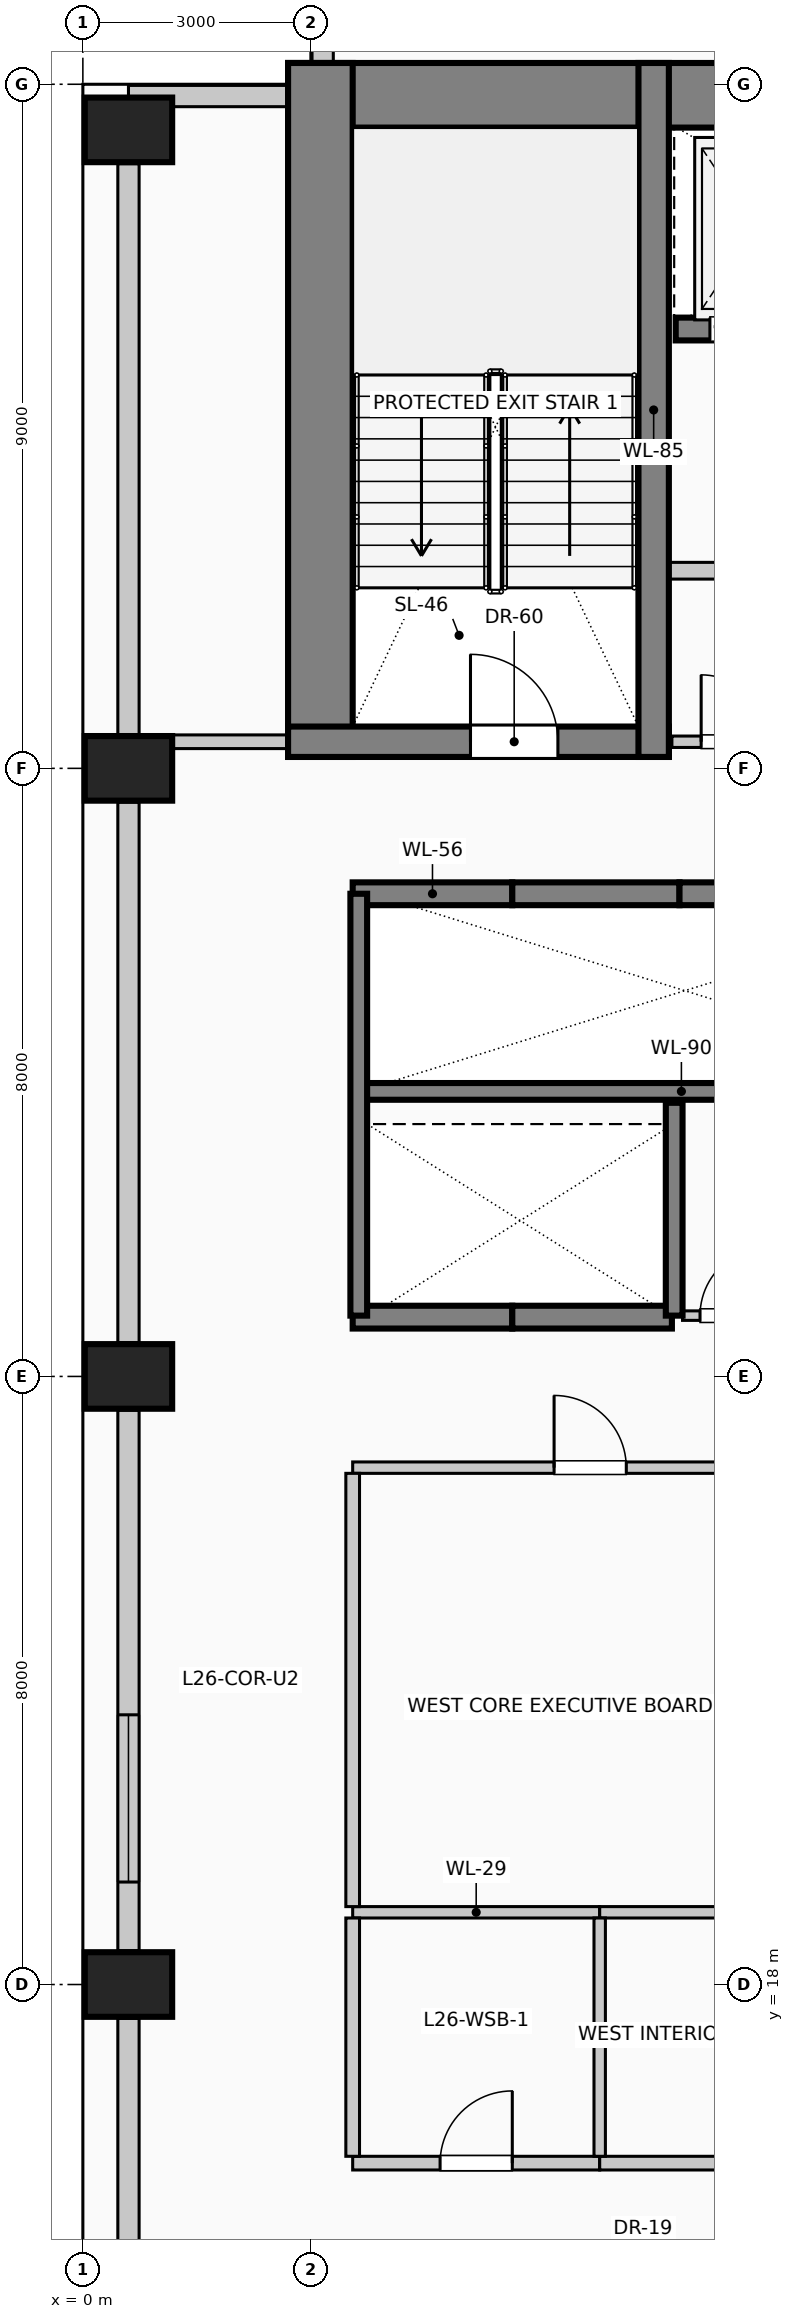
"""IFC4 building model, lengths in metres.
Left out: names, types, materials, properties, quantities, classifications, styles, units other than length and angle.
Written with IfcOpenShell. Run it as: python <this file> out.ifc"""

import sys

from ifc_helpers import new_model, si_unit, direction, frame, frame_2d, origin, origin_2d, place, context, subcontext, project, spatial, rectangle, extrude, element, fill, save


model = new_model("IFC4")
c1 = context("Model", 3, precision=1e-05, world=origin(), true_north=direction((0.0, 1.0)))
c2 = subcontext(c1, "Body", "Model", "MODEL_VIEW")
j1 = project(units=[si_unit("LENGTHUNIT", "METRE"), si_unit("PLANEANGLEUNIT", "RADIAN")], contexts=[c1])
p1 = place(None, origin())
s1 = spatial("IfcSite", under=j1, at=p1, CompositionType="ELEMENT")
p2 = place(p1, origin())
s2 = spatial("IfcBuilding", under=s1, at=p2, CompositionType="ELEMENT")
p3 = place(p2, frame((0.0, 0.0, 108.6)))
s3 = spatial("IfcBuildingStorey", under=s2, at=p3, CompositionType="ELEMENT", Elevation=108.6)
p4 = place(p3, frame((2.7, 42.855, 0.0), z_axis=(0.0, 0.0, 1.0), x_axis=(1.0, 0.0, 0.0)))
e1 = element("IfcWall", 1, at=p4, inside=s3, PredefinedType="SHEAR", context=c2, shape_type="SweptSolid", body=[
    extrude(rectangle(XDim=14.6, YDim=0.85, at=frame_2d((7.3, 0.0))), origin(), (0.0, 0.0, 1.0), 4.0),
])
p5 = place(p3, frame((3.125, 34.15, 0.0), z_axis=(0.0, 0.0, 1.0), x_axis=(0.0, 1.0, 0.0)))
e2 = element("IfcWall", 2, at=p5, inside=s3, PredefinedType="SHEAR", context=c2, shape_type="SweptSolid", body=[
    extrude(rectangle(XDim=9.13, YDim=0.85, at=frame_2d((4.565, 0.0))), origin(), (0.0, 0.0, 1.0), 4.0),
])
p6 = place(p3, frame((2.7, 34.35, 0.0), z_axis=(0.0, 0.0, 1.0), x_axis=(1.0, 0.0, 0.0)))
e3 = element("IfcWall", 3, at=p6, inside=s3, PredefinedType="SHEAR", context=c2, shape_type="SweptSolid", body=[
    extrude(rectangle(XDim=5.01, YDim=0.4, at=frame_2d((2.505, 0.0))), origin(), (0.0, 0.0, 1.0), 4.0),
])
p7 = place(p6, frame((2.4, 0.0, 0.0)))
e4 = element("IfcOpeningElement", 4, at=p7, cuts=e3, PredefinedType="OPENING", context=c2, shape_type="SweptSolid", body=[
    extrude(rectangle(XDim=1.15, YDim=2.2, at=frame_2d((0.575, 1.1))), frame((0.0, 0.21, 0.0), z_axis=(0.0, -1.0, 0.0), x_axis=(1.0, 0.0, 0.0)), (0.0, 0.0, 1.0), 0.42),
])
p8 = place(p3, frame((7.51, 34.15, 0.0), z_axis=(0.0, 0.0, 1.0), x_axis=(0.0, 1.0, 0.0)))
e5 = element("IfcWall", 5, at=p8, inside=s3, PredefinedType="SHEAR", context=c2, shape_type="SweptSolid", body=[
    extrude(rectangle(XDim=9.13, YDim=0.4, at=frame_2d((4.565, 0.0))), origin(), (0.0, 0.0, 1.0), 4.0),
])
for number, where, z_axis, x_axis in (
    (6, (0.6, 18.0, 0.0), (0.0, 0.0, 1.0), (0.0, 1.0, 0.0)),
    (7, (0.6, 26.0, 0.0), (0.0, 0.0, 1.0), (0.0, 1.0, 0.0)),
    (8, (0.6, 34.0, 0.0), (0.0, 0.0, 1.0), (0.0, 1.0, 0.0)),
    (9, (0.6, 42.4, 0.0), (0.0, 0.0, 1.0), (0.0, 1.0, 0.0)),
):
    element("IfcColumn", number, at=place(p3, frame(where, z_axis=z_axis, x_axis=x_axis)), inside=s3, PredefinedType="COLUMN", context=c2, shape_type="SweptSolid", body=[
        extrude(rectangle(XDim=0.85, YDim=1.15, at=origin_2d()), origin(), (0.0, 0.0, 1.0), 4.0),
    ])
p9 = place(p3, frame((0.6, 10.445, 0.0), z_axis=(0.0, 0.0, 1.0), x_axis=(0.0, 1.0, 0.0)))
e10 = element("IfcWall", 10, at=p9, inside=s3, PredefinedType="SOLIDWALL", context=c2, shape_type="SweptSolid", body=[
    extrude(rectangle(XDim=7.11, YDim=0.28, at=frame_2d((3.555, 0.0))), origin(), (0.0, 0.0, 1.0), 2.875),
])
p10 = place(p3, frame((0.6, 18.445, 0.0), z_axis=(0.0, 0.0, 1.0), x_axis=(0.0, 1.0, 0.0)))
e11 = element("IfcWall", 11, at=p10, inside=s3, PredefinedType="SOLIDWALL", context=c2, shape_type="SweptSolid", body=[
    extrude(rectangle(XDim=7.11, YDim=0.28, at=frame_2d((3.555, 0.0))), origin(), (0.0, 0.0, 1.0), 2.875),
])
p11 = place(p10, frame((0.903, 0.0, 0.5)))
e12 = element("IfcOpeningElement", 12, at=p11, cuts=e11, PredefinedType="OPENING", context=c2, shape_type="SweptSolid", body=[
    extrude(rectangle(XDim=2.2, YDim=1.95, at=frame_2d((1.1, 0.975))), frame((0.0, 0.15, 0.0), z_axis=(0.0, -1.0, 0.0), x_axis=(1.0, 0.0, 0.0)), (0.0, 0.0, 1.0), 0.3),
])
p12 = place(p3, frame((0.6, 26.445, 0.0), z_axis=(0.0, 0.0, 1.0), x_axis=(0.0, 1.0, 0.0)))
e13 = element("IfcWall", 13, at=p12, inside=s3, PredefinedType="SOLIDWALL", context=c2, shape_type="SweptSolid", body=[
    extrude(rectangle(XDim=7.11, YDim=0.28, at=frame_2d((3.555, 0.0))), origin(), (0.0, 0.0, 1.0), 2.875),
])
p13 = place(p3, frame((0.6, 34.445, 0.0), z_axis=(0.0, 0.0, 1.0), x_axis=(0.0, 1.0, 0.0)))
e14 = element("IfcWall", 14, at=p13, inside=s3, PredefinedType="SOLIDWALL", context=c2, shape_type="SweptSolid", body=[
    extrude(rectangle(XDim=7.51, YDim=0.28, at=frame_2d((3.755, 0.0))), origin(), (0.0, 0.0, 1.0), 2.875),
])
p14 = place(p3, frame((0.6, 42.845, 0.0), z_axis=(0.0, 0.0, 1.0), x_axis=(1.0, 0.0, 0.0)))
e15 = element("IfcWall", 15, at=p14, inside=s3, PredefinedType="SOLIDWALL", context=c2, shape_type="SweptSolid", body=[
    extrude(rectangle(XDim=2.095, YDim=0.28, at=frame_2d((1.047, 0.0))), origin(), (0.0, 0.0, 1.0), 3.725),
])
p15 = place(p3, frame((3.155, 43.285, 0.0), z_axis=(0.0, 0.0, 1.0), x_axis=(0.0, 1.0, 0.0)))
e16 = element("IfcWall", 16, at=p15, inside=s3, PredefinedType="SOLIDWALL", context=c2, shape_type="SweptSolid", body=[
    extrude(rectangle(XDim=2.115, YDim=0.28, at=frame_2d((1.058, 0.0))), origin(), (0.0, 0.0, 1.0), 3.725),
])
p16 = place(p3, frame((3.55, 32.35, 0.0), z_axis=(0.0, 0.0, 1.0), x_axis=(1.0, 0.0, 0.0)))
e17 = element("IfcWall", 17, at=p16, inside=s3, PredefinedType="SOLIDWALL", context=c2, shape_type="SweptSolid", body=[
    extrude(rectangle(XDim=2.1, YDim=0.3, at=frame_2d((1.05, 0.0))), origin(), (0.0, 0.0, 1.0), 4.0),
])
p17 = place(p3, frame((5.65, 32.35, 0.0), z_axis=(0.0, 0.0, 1.0), x_axis=(1.0, 0.0, 0.0)))
e18 = element("IfcWall", 18, at=p17, inside=s3, PredefinedType="SOLIDWALL", context=c2, shape_type="SweptSolid", body=[
    extrude(rectangle(XDim=2.2, YDim=0.3, at=frame_2d((1.1, 0.0))), origin(), (0.0, 0.0, 1.0), 4.0),
])
p18 = place(p3, frame((7.85, 32.35, 0.0), z_axis=(0.0, 0.0, 1.0), x_axis=(1.0, 0.0, 0.0)))
e19 = element("IfcWall", 19, at=p18, inside=s3, PredefinedType="SOLIDWALL", context=c2, shape_type="SweptSolid", body=[
    extrude(rectangle(XDim=2.2, YDim=0.3, at=frame_2d((1.1, 0.0))), origin(), (0.0, 0.0, 1.0), 4.0),
])
p19 = place(p3, frame((5.65, 26.78, 0.0), z_axis=(0.0, 0.0, 1.0), x_axis=(-1.0, 0.0, 0.0)))
e20 = element("IfcWall", 20, at=p19, inside=s3, PredefinedType="SOLIDWALL", context=c2, shape_type="SweptSolid", body=[
    extrude(rectangle(XDim=2.1, YDim=0.3, at=frame_2d((1.05, 0.0))), origin(), (0.0, 0.0, 1.0), 4.0),
])
p20 = place(p3, frame((7.75, 26.78, 0.0), z_axis=(0.0, 0.0, 1.0), x_axis=(-1.0, 0.0, 0.0)))
e21 = element("IfcWall", 21, at=p20, inside=s3, PredefinedType="SOLIDWALL", context=c2, shape_type="SweptSolid", body=[
    extrude(rectangle(XDim=2.1, YDim=0.3, at=frame_2d((1.05, 0.0))), origin(), (0.0, 0.0, 1.0), 4.0),
])
p21 = place(p3, frame((10.0, 39.78, 0.0), z_axis=(0.0, 0.0, 1.0), x_axis=(-1.0, 0.0, 0.0)))
e22 = element("IfcWall", 22, at=p21, inside=s3, PredefinedType="SOLIDWALL", context=c2, shape_type="SweptSolid", body=[
    extrude(rectangle(XDim=2.2, YDim=0.3, at=frame_2d((1.1, 0.0))), origin(), (0.0, 0.0, 1.0), 4.0),
])
p22 = place(p21, frame((0.45, 0.0, 0.0)))
e23 = element("IfcOpeningElement", 23, at=p22, cuts=e22, PredefinedType="OPENING", context=c2, shape_type="SweptSolid", body=[
    extrude(rectangle(XDim=1.3, YDim=2.25, at=frame_2d((0.65, 1.125))), frame((0.0, 0.16, 0.0), z_axis=(0.0, -1.0, 0.0), x_axis=(1.0, 0.0, 0.0)), (0.0, 0.0, 1.0), 0.32),
])
p23 = place(p3, frame((3.55, 29.75, 0.0), z_axis=(0.0, 0.0, 1.0), x_axis=(1.0, 0.0, 0.0)))
e24 = element("IfcWall", 24, at=p23, inside=s3, PredefinedType="SOLIDWALL", context=c2, shape_type="SweptSolid", body=[
    extrude(rectangle(XDim=8.65, YDim=0.22, at=frame_2d((4.325, 0.0))), origin(), (0.0, 0.0, 1.0), 4.0),
])
p24 = place(p3, frame((3.63, 26.8, 0.0), z_axis=(0.0, 0.0, 1.0), x_axis=(0.0, 1.0, 0.0)))
e25 = element("IfcWall", 25, at=p24, inside=s3, PredefinedType="SOLIDWALL", context=c2, shape_type="SweptSolid", body=[
    extrude(rectangle(XDim=5.55, YDim=0.22, at=frame_2d((2.775, 0.0))), origin(), (0.0, 0.0, 1.0), 4.0),
])
p25 = place(p3, frame((7.78, 26.8, 0.0), z_axis=(0.0, 0.0, 1.0), x_axis=(0.0, 1.0, 0.0)))
e26 = element("IfcWall", 26, at=p25, inside=s3, PredefinedType="SOLIDWALL", context=c2, shape_type="SweptSolid", body=[
    extrude(rectangle(XDim=2.8, YDim=0.22, at=frame_2d((1.4, 0.0))), origin(), (0.0, 0.0, 1.0), 4.0),
])
p26 = place(p3, frame((7.51, 36.6, 0.0), z_axis=(0.0, 0.0, 1.0), x_axis=(1.0, 0.0, 0.0)))
e27 = element("IfcWall", 27, at=p26, inside=s3, PredefinedType="PARTITIONING", context=c2, shape_type="SweptSolid", body=[
    extrude(rectangle(XDim=4.98, YDim=0.22, at=frame_2d((2.49, 0.0))), origin(), (0.0, 0.0, 1.0), 3.725),
])
p27 = place(p26, frame((1.94, 0.0, 0.0)))
e28 = element("IfcOpeningElement", 28, at=p27, cuts=e27, PredefinedType="OPENING", context=c2, shape_type="SweptSolid", body=[
    extrude(rectangle(XDim=1.1, YDim=2.2, at=frame_2d((0.55, 1.1))), frame((0.0, 0.12, 0.0), z_axis=(0.0, -1.0, 0.0), x_axis=(1.0, 0.0, 0.0)), (0.0, 0.0, 1.0), 0.24),
])
p28 = place(p3, frame((3.55, 15.65, 0.0), z_axis=(0.0, 0.0, 1.0), x_axis=(1.0, 0.0, 0.0)))
e29 = element("IfcWall", 29, at=p28, inside=s3, PredefinedType="PARTITIONING", context=c2, shape_type="SweptSolid", body=[
    extrude(rectangle(XDim=3.25, YDim=0.18, at=frame_2d((1.625, 0.0))), origin(), (0.0, 0.0, 1.0), 3.725),
])
p29 = place(p28, frame((1.15, 0.0, 0.0)))
e30 = element("IfcOpeningElement", 30, at=p29, cuts=e29, PredefinedType="OPENING", context=c2, shape_type="SweptSolid", body=[
    extrude(rectangle(XDim=0.95, YDim=2.15, at=frame_2d((0.475, 1.075))), frame((0.0, 0.1, 0.0), z_axis=(0.0, -1.0, 0.0), x_axis=(1.0, 0.0, 0.0)), (0.0, 0.0, 1.0), 0.2),
])
p30 = place(p3, frame((6.8, 15.65, 0.0), z_axis=(0.0, 0.0, 1.0), x_axis=(1.0, 0.0, 0.0)))
e31 = element("IfcWall", 31, at=p30, inside=s3, PredefinedType="PARTITIONING", context=c2, shape_type="SweptSolid", body=[
    extrude(rectangle(XDim=9.05, YDim=0.18, at=frame_2d((4.525, 0.0))), origin(), (0.0, 0.0, 1.0), 3.725),
])
p31 = place(p30, frame((4.0, 0.0, 0.0)))
e32 = element("IfcOpeningElement", 32, at=p31, cuts=e31, PredefinedType="OPENING", context=c2, shape_type="SweptSolid", body=[
    extrude(rectangle(XDim=1.05, YDim=2.15, at=frame_2d((0.525, 1.075))), frame((0.0, 0.1, 0.0), z_axis=(0.0, -1.0, 0.0), x_axis=(1.0, 0.0, 0.0)), (0.0, 0.0, 1.0), 0.2),
])
p32 = place(p3, frame((3.55, 18.95, 0.0), z_axis=(0.0, 0.0, 1.0), x_axis=(1.0, 0.0, 0.0)))
e33 = element("IfcWall", 33, at=p32, inside=s3, PredefinedType="PARTITIONING", context=c2, shape_type="SweptSolid", body=[
    extrude(rectangle(XDim=3.25, YDim=0.15, at=frame_2d((1.625, 0.0))), origin(), (0.0, 0.0, 1.0), 3.725),
])
p33 = place(p3, frame((6.8, 18.95, 0.0), z_axis=(0.0, 0.0, 1.0), x_axis=(1.0, 0.0, 0.0)))
e34 = element("IfcWall", 34, at=p33, inside=s3, PredefinedType="PARTITIONING", context=c2, shape_type="SweptSolid", body=[
    extrude(rectangle(XDim=3.0, YDim=0.15, at=frame_2d((1.5, 0.0))), origin(), (0.0, 0.0, 1.0), 3.725),
])
p34 = place(p3, frame((3.55, 24.8, 0.0), z_axis=(0.0, 0.0, 1.0), x_axis=(1.0, 0.0, 0.0)))
e35 = element("IfcWall", 35, at=p34, inside=s3, PredefinedType="PARTITIONING", context=c2, shape_type="SweptSolid", body=[
    extrude(rectangle(XDim=6.25, YDim=0.15, at=frame_2d((3.125, 0.0))), origin(), (0.0, 0.0, 1.0), 3.725),
])
p35 = place(p34, frame((2.65, 0.0, 0.0)))
e36 = element("IfcOpeningElement", 36, at=p35, cuts=e35, PredefinedType="OPENING", context=c2, shape_type="SweptSolid", body=[
    extrude(rectangle(XDim=0.95, YDim=2.15, at=frame_2d((0.475, 1.075))), frame((0.0, 0.085, 0.0), z_axis=(0.0, -1.0, 0.0), x_axis=(1.0, 0.0, 0.0)), (0.0, 0.0, 1.0), 0.17),
])
p36 = place(p3, frame((7.89, 26.8, 0.0), z_axis=(0.0, 0.0, 1.0), x_axis=(1.0, 0.0, 0.0)))
e37 = element("IfcWall", 37, at=p36, inside=s3, PredefinedType="PARTITIONING", context=c2, shape_type="SweptSolid", body=[
    extrude(rectangle(XDim=1.36, YDim=0.125, at=frame_2d((0.68, 0.0))), origin(), (0.0, 0.0, 1.0), 3.725),
])
p37 = place(p36, frame((0.23, 0.0, 0.0)))
e38 = element("IfcOpeningElement", 38, at=p37, cuts=e37, PredefinedType="OPENING", context=c2, shape_type="SweptSolid", body=[
    extrude(rectangle(XDim=0.9, YDim=2.1, at=frame_2d((0.45, 1.05))), frame((0.0, 0.073, 0.0), z_axis=(0.0, -1.0, 0.0), x_axis=(1.0, 0.0, 0.0)), (0.0, 0.0, 1.0), 0.145),
])
p38 = place(p3, frame((1.175, 34.35, 0.0), z_axis=(0.0, 0.0, 1.0), x_axis=(1.0, 0.0, 0.0)))
e39 = element("IfcWall", 39, at=p38, inside=s3, PredefinedType="PARTITIONING", context=c2, shape_type="SweptSolid", body=[
    extrude(rectangle(XDim=1.525, YDim=0.18, at=frame_2d((0.762, 0.0))), origin(), (0.0, 0.0, 1.0), 3.725),
])
p39 = place(p3, frame((7.75, 34.35, 0.0), z_axis=(0.0, 0.0, 1.0), x_axis=(1.0, 0.0, 0.0)))
e40 = element("IfcWall", 40, at=p39, inside=s3, PredefinedType="PARTITIONING", context=c2, shape_type="SweptSolid", body=[
    extrude(rectangle(XDim=1.65, YDim=0.15, at=frame_2d((0.825, 0.0))), origin(), (0.0, 0.0, 1.0), 3.725),
])
p40 = place(p39, frame((0.385, 0.0, 0.0)))
e41 = element("IfcOpeningElement", 41, at=p40, cuts=e40, PredefinedType="OPENING", context=c2, shape_type="SweptSolid", body=[
    extrude(rectangle(XDim=0.88, YDim=2.1, at=frame_2d((0.44, 1.05))), frame((0.0, 0.085, 0.0), z_axis=(0.0, -1.0, 0.0), x_axis=(1.0, 0.0, 0.0)), (0.0, 0.0, 1.0), 0.17),
])
p41 = place(p3, frame((3.55, 15.74, 0.0), z_axis=(0.0, 0.0, 1.0), x_axis=(0.0, 1.0, 0.0)))
e42 = element("IfcWall", 42, at=p41, inside=s3, PredefinedType="PARTITIONING", context=c2, shape_type="SweptSolid", body=[
    extrude(rectangle(XDim=3.135, YDim=0.18, at=frame_2d((1.567, 0.0))), origin(), (0.0, 0.0, 1.0), 3.725),
])
p42 = place(p3, frame((3.55, 19.025, 0.0), z_axis=(0.0, 0.0, 1.0), x_axis=(0.0, 1.0, 0.0)))
e43 = element("IfcWall", 43, at=p42, inside=s3, PredefinedType="PARTITIONING", context=c2, shape_type="SweptSolid", body=[
    extrude(rectangle(XDim=5.7, YDim=0.18, at=frame_2d((2.85, 0.0))), origin(), (0.0, 0.0, 1.0), 3.725),
])
p43 = place(p3, frame((6.8, 15.74, 0.0), z_axis=(0.0, 0.0, 1.0), x_axis=(0.0, 1.0, 0.0)))
e44 = element("IfcWall", 44, at=p43, inside=s3, PredefinedType="PARTITIONING", context=c2, shape_type="SweptSolid", body=[
    extrude(rectangle(XDim=3.135, YDim=0.15, at=frame_2d((1.567, 0.0))), origin(), (0.0, 0.0, 1.0), 3.725),
])
p44 = place(p11, origin())
e45 = element("IfcWindow", 45, at=p44, inside=s3, PartitioningType="SINGLE_PANEL", PredefinedType="WINDOW", context=c2, shape_type="SweptSolid", body=[
    extrude(rectangle(XDim=2.2, YDim=1.95, at=frame_2d((1.1, 0.975))), frame((0.0, 0.03, 0.0), z_axis=(0.0, -1.0, 0.0), x_axis=(1.0, 0.0, 0.0)), (0.0, 0.0, 1.0), 0.06),
])
fill(e12, e45)
p45 = place(p22, origin())
e46 = element("IfcDoor", 46, at=p45, inside=s3, OperationType="SLIDING_TO_LEFT", PredefinedType="DOOR", context=c2, shape_type="SweptSolid", body=[
    extrude(rectangle(XDim=1.3, YDim=2.25, at=frame_2d((0.65, 1.125))), frame((0.0, 0.025, 0.0), z_axis=(0.0, -1.0, 0.0), x_axis=(1.0, 0.0, 0.0)), (0.0, 0.0, 1.0), 0.05),
])
fill(e23, e46)
p46 = place(p7, origin())
e47 = element("IfcDoor", 47, at=p46, inside=s3, OperationType="SINGLE_SWING_LEFT", PredefinedType="DOOR", context=c2, shape_type="SweptSolid", body=[
    extrude(rectangle(XDim=1.15, YDim=2.2, at=frame_2d((0.575, 1.1))), frame((0.0, 0.025, 0.0), z_axis=(0.0, -1.0, 0.0), x_axis=(1.0, 0.0, 0.0)), (0.0, 0.0, 1.0), 0.05),
])
fill(e4, e47)
p47 = place(p29, origin())
e48 = element("IfcDoor", 48, at=p47, inside=s3, OperationType="SINGLE_SWING_RIGHT", PredefinedType="DOOR", context=c2, shape_type="SweptSolid", body=[
    extrude(rectangle(XDim=0.95, YDim=2.15, at=frame_2d((0.475, 1.075))), frame((0.0, 0.025, 0.0), z_axis=(0.0, -1.0, 0.0), x_axis=(1.0, 0.0, 0.0)), (0.0, 0.0, 1.0), 0.05),
])
fill(e30, e48)
p48 = place(p35, origin())
e49 = element("IfcDoor", 49, at=p48, inside=s3, OperationType="SINGLE_SWING_LEFT", PredefinedType="DOOR", context=c2, shape_type="SweptSolid", body=[
    extrude(rectangle(XDim=0.95, YDim=2.15, at=frame_2d((0.475, 1.075))), frame((0.0, 0.025, 0.0), z_axis=(0.0, -1.0, 0.0), x_axis=(1.0, 0.0, 0.0)), (0.0, 0.0, 1.0), 0.05),
])
fill(e36, e49)
p49 = place(p37, origin())
e50 = element("IfcDoor", 50, at=p49, inside=s3, OperationType="SINGLE_SWING_RIGHT", PredefinedType="DOOR", context=c2, shape_type="SweptSolid", body=[
    extrude(rectangle(XDim=0.9, YDim=2.1, at=frame_2d((0.45, 1.05))), frame((0.0, 0.025, 0.0), z_axis=(0.0, -1.0, 0.0), x_axis=(1.0, 0.0, 0.0)), (0.0, 0.0, 1.0), 0.05),
])
fill(e38, e50)
p50 = place(p40, origin())
e51 = element("IfcDoor", 51, at=p50, inside=s3, OperationType="SINGLE_SWING_LEFT", PredefinedType="DOOR", context=c2, shape_type="SweptSolid", body=[
    extrude(rectangle(XDim=0.88, YDim=2.1, at=frame_2d((0.44, 1.05))), frame((0.0, 0.025, 0.0), z_axis=(0.0, -1.0, 0.0), x_axis=(1.0, 0.0, 0.0)), (0.0, 0.0, 1.0), 0.05),
])
fill(e41, e51)
save(model, sys.argv[1])
